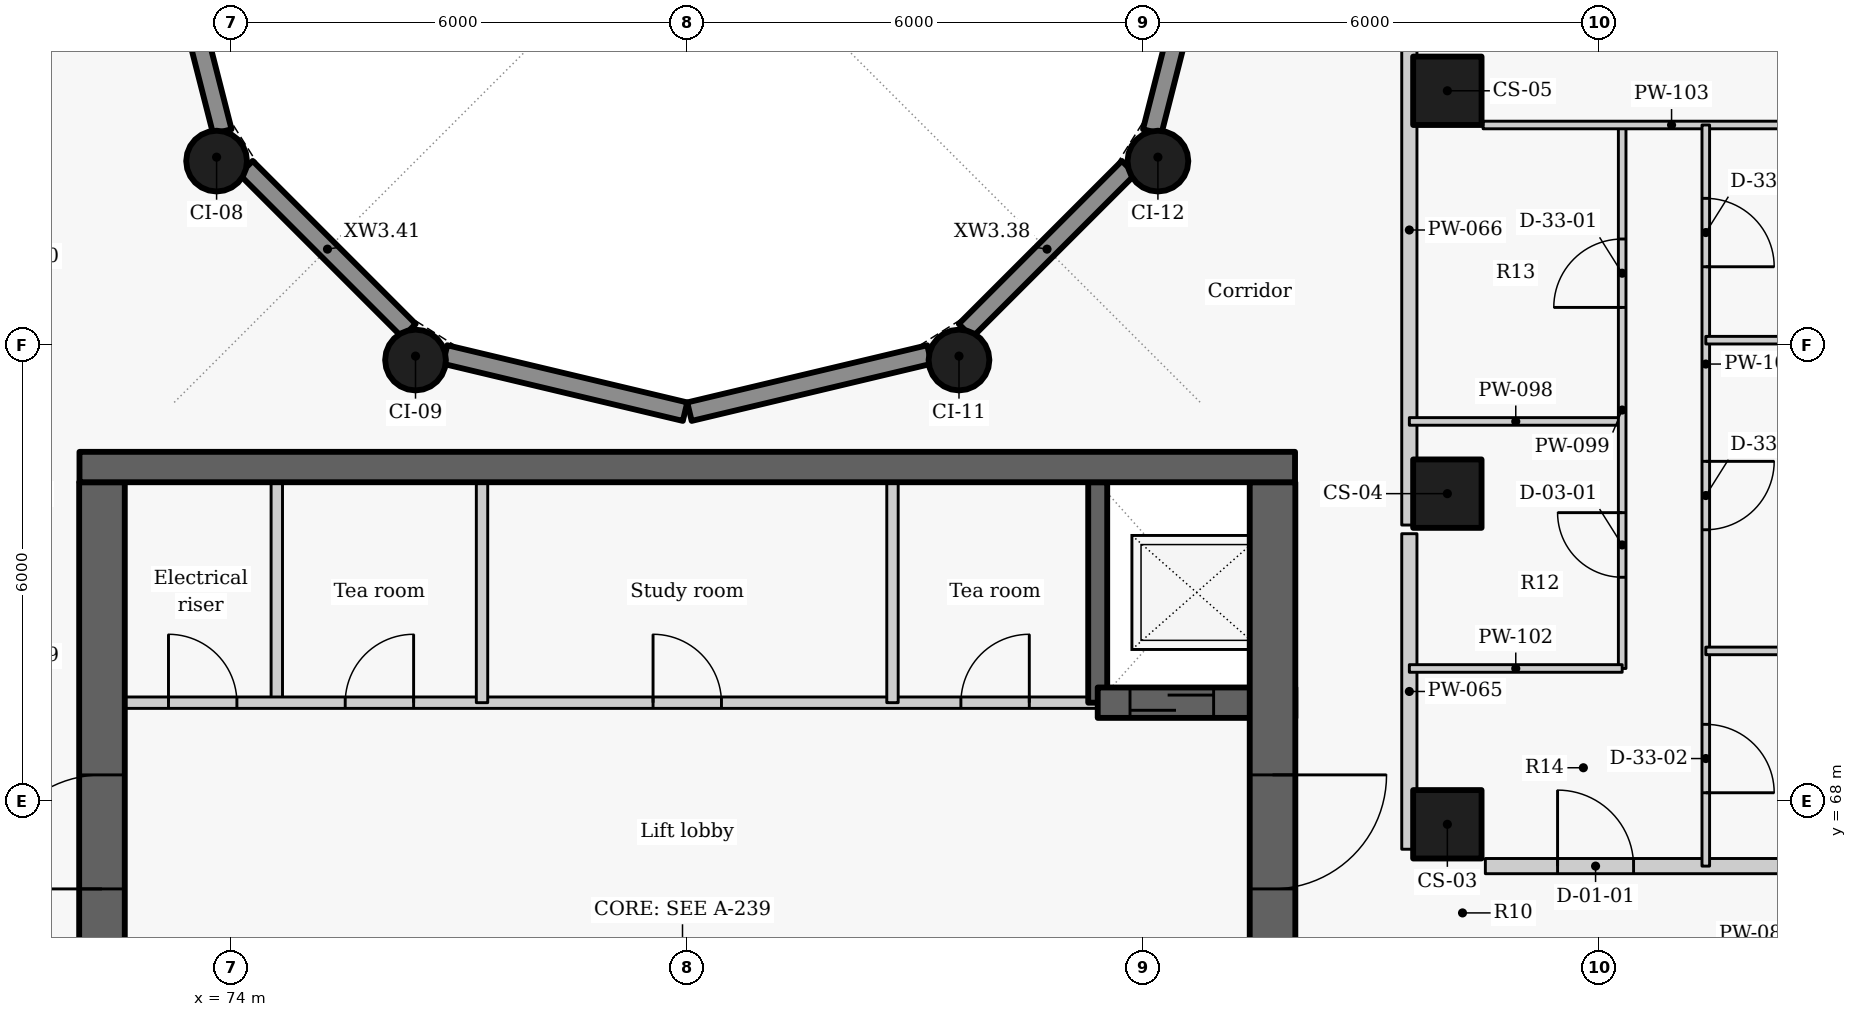
"""IFC4 building model, lengths in metres.
Left out: names, types, materials, properties, quantities, classifications, styles, units other than length and angle.
Written with IfcOpenShell. Run it as: python <this file> out.ifc"""

import sys

from ifc_helpers import new_model, si_unit, direction, frame, frame_2d, origin, origin_2d, place, context, subcontext, project, spatial, rectangle, circle, extrude, element, fill, save


model = new_model("IFC4")
c1 = context("Model", 3, precision=1e-05, world=origin(), true_north=direction((0.0, 1.0)))
c2 = subcontext(c1, "Body", "Model", "MODEL_VIEW")
j1 = project(units=[si_unit("LENGTHUNIT", "METRE"), si_unit("PLANEANGLEUNIT", "RADIAN")], contexts=[c1])
p1 = place(None, origin())
s1 = spatial("IfcSite", under=j1, at=p1, CompositionType="ELEMENT")
p2 = place(p1, origin())
s2 = spatial("IfcBuilding", under=s1, at=p2, CompositionType="ELEMENT")
p3 = place(p2, frame((0.0, 0.0, 226.2)))
s3 = spatial("IfcBuildingStorey", under=s2, at=p3, CompositionType="ELEMENT", Elevation=226.2)
for number, where, z_axis, x_axis in (
    (1, (90.0, 67.7, 0.0), (0.0, 0.0, 1.0), (0.0, 1.0, 0.0)),
    (2, (90.0, 72.05, 0.0), (0.0, 0.0, 1.0), (0.0, 1.0, 0.0)),
    (3, (90.0, 77.35, 0.0), (0.0, 0.0, 1.0), (0.0, 1.0, 0.0)),
):
    element("IfcColumn", number, at=place(p3, frame(where, z_axis=z_axis, x_axis=x_axis)), inside=s3, PredefinedType="COLUMN", context=c2, shape_type="SweptSolid", body=[
        extrude(rectangle(XDim=0.9, YDim=0.9, at=origin_2d()), origin(), (0.0, 0.0, 1.0), 3.3),
    ])
for number, where, z_axis, x_axis in (
    (4, (73.808, 76.425, 0.0), (0.0, 0.0, 1.0), (0.5, -0.866, 0.0)),
    (5, (76.425, 73.808, 0.0), (0.0, 0.0, 1.0), (0.866, -0.5, 0.0)),
    (6, (83.575, 73.808, 0.0), (0.0, 0.0, 1.0), (0.866, 0.5, 0.0)),
    (7, (86.192, 76.425, 0.0), (0.0, 0.0, 1.0), (0.5, 0.866, 0.0)),
):
    element("IfcColumn", number, at=place(p3, frame(where, z_axis=z_axis, x_axis=x_axis)), inside=s3, PredefinedType="COLUMN", context=c2, shape_type="SweptSolid", body=[
        extrude(circle(Radius=0.4, at=origin_2d()), origin(), (0.0, 0.0, 1.0), 3.3),
    ])
p4 = place(p3, frame((86.86, 79.73, 0.0), z_axis=(0.0, 0.0, 1.0), x_axis=(-0.247055971283, -0.969001211069, 0.0)))
e8 = element("IfcWall", 8, at=p4, inside=s3, PredefinedType="SOLIDWALL", context=c2, shape_type="SweptSolid", body=[
    extrude(rectangle(XDim=3.01, YDim=0.25, at=frame_2d((1.505, 0.0))), origin(), (0.0, 0.0, 1.0), 2.425),
])
p5 = place(p3, frame((85.806, 76.339, 0.0), z_axis=(0.0, 0.0, 1.0), x_axis=(-0.707106781187, -0.707106781187, 0.0)))
e9 = element("IfcWall", 9, at=p5, inside=s3, PredefinedType="SOLIDWALL", context=c2, shape_type="SweptSolid", body=[
    extrude(rectangle(XDim=3.033, YDim=0.25, at=frame_2d((1.517, 0.0))), origin(), (0.0, 0.0, 1.0), 2.425),
])
for number, where, z_axis, x_axis in (
    (10, (83.186, 73.881, 0.0), (0.0, 0.0, 1.0), (-0.973, -0.232, 0.0)),
    (11, (79.971, 73.128, 0.0), (0.0, 0.0, 1.0), (-0.973, 0.232, 0.0)),
):
    element("IfcWall", number, at=place(p3, frame(where, z_axis=z_axis, x_axis=x_axis)), inside=s3, PredefinedType="SOLIDWALL", context=c2, shape_type="SweptSolid", body=[
        extrude(rectangle(XDim=3.246, YDim=0.25, at=frame_2d((1.623, 0.0))), origin(), (0.0, 0.0, 1.0), 2.425),
    ])
p6 = place(p3, frame((76.339, 74.194, 0.0), z_axis=(0.0, 0.0, 1.0), x_axis=(-0.707106781187, 0.707106781187, 0.0)))
e12 = element("IfcWall", 12, at=p6, inside=s3, PredefinedType="SOLIDWALL", context=c2, shape_type="SweptSolid", body=[
    extrude(rectangle(XDim=3.033, YDim=0.25, at=frame_2d((1.517, 0.0))), origin(), (0.0, 0.0, 1.0), 2.425),
])
p7 = place(p3, frame((73.883, 76.813, 0.0), z_axis=(0.0, 0.0, 1.0), x_axis=(-0.247055971283, 0.969001211069, 0.0)))
e13 = element("IfcWall", 13, at=p7, inside=s3, PredefinedType="SOLIDWALL", context=c2, shape_type="SweptSolid", body=[
    extrude(rectangle(XDim=3.01, YDim=0.25, at=frame_2d((1.505, 0.0))), origin(), (0.0, 0.0, 1.0), 2.425),
])
p8 = place(p3, frame((74.6, 69.3, 0.0), z_axis=(0.0, 0.0, 1.0), x_axis=(0.0, 1.0, 0.0)))
e14 = element("IfcWall", 14, at=p8, inside=s3, PredefinedType="PARTITIONING", context=c2, shape_type="SweptSolid", body=[
    extrude(rectangle(XDim=2.9, YDim=0.15, at=frame_2d((1.45, 0.0))), origin(), (0.0, 0.0, 1.0), 3.025),
])
p9 = place(p3, frame((72.0, 69.3, 0.0), z_axis=(0.0, 0.0, 1.0), x_axis=(1.0, 0.0, 0.0)))
e15 = element("IfcWall", 15, at=p9, inside=s3, PredefinedType="PARTITIONING", context=c2, shape_type="SweptSolid", body=[
    extrude(rectangle(XDim=13.4, YDim=0.15, at=frame_2d((6.7, 0.0))), origin(), (0.0, 0.0, 1.0), 3.025),
])
p10 = place(p9, frame((1.175, 0.0, 0.0)))
e16 = element("IfcOpeningElement", 16, at=p10, cuts=e15, PredefinedType="OPENING", context=c2, shape_type="SweptSolid", body=[
    extrude(rectangle(XDim=0.9, YDim=2.1, at=frame_2d((0.45, 1.05))), frame((0.0, 0.085, 0.0), z_axis=(0.0, -1.0, 0.0), x_axis=(1.0, 0.0, 0.0)), (0.0, 0.0, 1.0), 0.17),
])
p11 = place(p9, frame((3.5, 0.0, 0.0)))
e17 = element("IfcOpeningElement", 17, at=p11, cuts=e15, PredefinedType="OPENING", context=c2, shape_type="SweptSolid", body=[
    extrude(rectangle(XDim=0.9, YDim=2.1, at=frame_2d((0.45, 1.05))), frame((0.0, 0.085, 0.0), z_axis=(0.0, -1.0, 0.0), x_axis=(1.0, 0.0, 0.0)), (0.0, 0.0, 1.0), 0.17),
])
p12 = place(p9, frame((7.55, 0.0, 0.0)))
e18 = element("IfcOpeningElement", 18, at=p12, cuts=e15, PredefinedType="OPENING", context=c2, shape_type="SweptSolid", body=[
    extrude(rectangle(XDim=0.9, YDim=2.1, at=frame_2d((0.45, 1.05))), frame((0.0, 0.085, 0.0), z_axis=(0.0, -1.0, 0.0), x_axis=(1.0, 0.0, 0.0)), (0.0, 0.0, 1.0), 0.17),
])
p13 = place(p9, frame((11.6, 0.0, 0.0)))
e19 = element("IfcOpeningElement", 19, at=p13, cuts=e15, PredefinedType="OPENING", context=c2, shape_type="SweptSolid", body=[
    extrude(rectangle(XDim=0.9, YDim=2.1, at=frame_2d((0.45, 1.05))), frame((0.0, 0.085, 0.0), z_axis=(0.0, -1.0, 0.0), x_axis=(1.0, 0.0, 0.0)), (0.0, 0.0, 1.0), 0.17),
])
p14 = place(p3, frame((72.3, 63.1, -0.41), z_axis=(0.0, 0.0, 1.0), x_axis=(0.0, 1.0, 0.0)))
e20 = element("IfcWall", 20, at=p14, inside=s3, PredefinedType="SHEAR", context=c2, shape_type="SweptSolid", body=[
    extrude(rectangle(XDim=9.1, YDim=0.6, at=frame_2d((4.55, 0.0))), origin(), (0.0, 0.0, 1.0), 3.435),
])
p15 = place(p14, frame((3.75, 0.0, 0.41)))
e21 = element("IfcOpeningElement", 21, at=p15, cuts=e20, PredefinedType="OPENING", context=c2, shape_type="SweptSolid", body=[
    extrude(rectangle(XDim=1.5, YDim=2.1, at=frame_2d((0.75, 1.05))), frame((0.0, 0.31, 0.0), z_axis=(0.0, -1.0, 0.0), x_axis=(1.0, 0.0, 0.0)), (0.0, 0.0, 1.0), 0.62),
])
p16 = place(p3, frame((85.4, 69.3, -0.41), z_axis=(0.0, 0.0, 1.0), x_axis=(0.0, 1.0, 0.0)))
e22 = element("IfcWall", 22, at=p16, inside=s3, PredefinedType="SHEAR", context=c2, shape_type="SweptSolid", body=[
    extrude(rectangle(XDim=2.9, YDim=0.25, at=frame_2d((1.45, 0.0))), origin(), (0.0, 0.0, 1.0), 3.435),
])
p17 = place(p3, frame((85.4, 69.3, -0.41), z_axis=(0.0, 0.0, 1.0), x_axis=(1.0, 0.0, 0.0)))
e23 = element("IfcWall", 23, at=p17, inside=s3, PredefinedType="SHEAR", context=c2, shape_type="SweptSolid", body=[
    extrude(rectangle(XDim=2.6, YDim=0.4, at=frame_2d((1.3, 0.0))), origin(), (0.0, 0.0, 1.0), 3.435),
])
p18 = place(p17, frame((0.425, 0.0, 0.41)))
e24 = element("IfcOpeningElement", 24, at=p18, cuts=e23, PredefinedType="OPENING", context=c2, shape_type="SweptSolid", body=[
    extrude(rectangle(XDim=1.1, YDim=2.1, at=frame_2d((0.55, 1.05))), frame((0.0, 0.21, 0.0), z_axis=(0.0, -1.0, 0.0), x_axis=(1.0, 0.0, 0.0)), (0.0, 0.0, 1.0), 0.42),
])
p19 = place(p3, frame((87.7, 72.2, -0.41), z_axis=(0.0, 0.0, 1.0), x_axis=(0.0, -1.0, 0.0)))
e25 = element("IfcWall", 25, at=p19, inside=s3, PredefinedType="SHEAR", context=c2, shape_type="SweptSolid", body=[
    extrude(rectangle(XDim=14.25, YDim=0.6, at=frame_2d((7.125, 0.0))), origin(), (0.0, 0.0, 1.0), 3.435),
])
p20 = place(p19, frame((3.85, 0.0, 0.41)))
e26 = element("IfcOpeningElement", 26, at=p20, cuts=e25, PredefinedType="OPENING", context=c2, shape_type="SweptSolid", body=[
    extrude(rectangle(XDim=1.5, YDim=2.1, at=frame_2d((0.75, 1.05))), frame((0.0, 0.31, 0.0), z_axis=(0.0, -1.0, 0.0), x_axis=(1.0, 0.0, 0.0)), (0.0, 0.0, 1.0), 0.62),
])
p21 = place(p19, frame((11.125, 0.0, 0.41)))
e27 = element("IfcOpeningElement", 27, at=p21, cuts=e25, PredefinedType="OPENING", context=c2, shape_type="SweptSolid", body=[
    extrude(rectangle(XDim=1.1, YDim=2.1, at=frame_2d((0.55, 1.05))), frame((0.0, 0.31, 0.0), z_axis=(0.0, -1.0, 0.0), x_axis=(1.0, 0.0, 0.0)), (0.0, 0.0, 1.0), 0.62),
])
for number, where, z_axis, x_axis in (
    (28, (77.3, 69.3, 0.0), (0.0, 0.0, 1.0), (0.0, 1.0, 0.0)),
    (29, (82.7, 69.3, 0.0), (0.0, 0.0, 1.0), (0.0, 1.0, 0.0)),
):
    element("IfcWall", number, at=place(p3, frame(where, z_axis=z_axis, x_axis=x_axis)), inside=s3, PredefinedType="PARTITIONING", context=c2, shape_type="SweptSolid", body=[
        extrude(rectangle(XDim=2.9, YDim=0.15, at=frame_2d((1.45, 0.0))), origin(), (0.0, 0.0, 1.0), 3.025),
    ])
p22 = place(p3, frame((89.5, 67.372, 0.0), z_axis=(0.0, 0.0, 1.0), x_axis=(0.0, 1.0, 0.0)))
e30 = element("IfcWall", 30, at=p22, inside=s3, PredefinedType="PARTITIONING", context=c2, shape_type="SweptSolid", body=[
    extrude(rectangle(XDim=4.151, YDim=0.2, at=frame_2d((2.075, 0.0))), origin(), (0.0, 0.0, 1.0), 3.025),
])
p23 = place(p3, frame((89.5, 87.423, 0.0), z_axis=(0.0, 0.0, 1.0), x_axis=(0.0, -1.0, 0.0)))
e31 = element("IfcWall", 31, at=p23, inside=s3, PredefinedType="PARTITIONING", context=c2, shape_type="SweptSolid", body=[
    extrude(rectangle(XDim=15.786, YDim=0.2, at=frame_2d((7.893, 0.0))), origin(), (0.0, 0.0, 1.0), 3.025),
])
p24 = place(p23, frame((6.923, 0.0, 0.0)))
e32 = element("IfcOpeningElement", 32, at=p24, cuts=e31, PredefinedType="OPENING", context=c2, shape_type="SweptSolid", body=[
    extrude(rectangle(XDim=1.0, YDim=2.1, at=frame_2d((0.5, 1.05))), frame((0.0, 0.11, 0.0), z_axis=(0.0, -1.0, 0.0), x_axis=(1.0, 0.0, 0.0)), (0.0, 0.0, 1.0), 0.22),
])
p25 = place(p23, frame((3.023, 0.0, 0.0)))
e33 = element("IfcOpeningElement", 33, at=p25, cuts=e31, PredefinedType="OPENING", context=c2, shape_type="SweptSolid", body=[
    extrude(rectangle(XDim=1.0, YDim=2.1, at=frame_2d((0.5, 1.05))), frame((0.0, 0.11, 0.0), z_axis=(0.0, -1.0, 0.0), x_axis=(1.0, 0.0, 0.0)), (0.0, 0.0, 1.0), 0.22),
])
p26 = place(p3, frame((90.5, 67.15, 0.0), z_axis=(0.0, 0.0, 1.0), x_axis=(1.0, 0.0, 0.0)))
e34 = element("IfcWall", 34, at=p26, inside=s3, PredefinedType="PARTITIONING", context=c2, shape_type="SweptSolid", body=[
    extrude(rectangle(XDim=7.889, YDim=0.2, at=frame_2d((3.944, 0.0))), origin(), (0.0, 0.0, 1.0), 2.405),
])
p27 = place(p26, frame((0.95, 0.0, 0.0)))
e35 = element("IfcOpeningElement", 35, at=p27, cuts=e34, PredefinedType="OPENING", context=c2, shape_type="SweptSolid", body=[
    extrude(rectangle(XDim=1.0, YDim=2.1, at=frame_2d((0.5, 1.05))), frame((0.0, 0.11, 0.0), z_axis=(0.0, -1.0, 0.0), x_axis=(1.0, 0.0, 0.0)), (0.0, 0.0, 1.0), 0.22),
])
p28 = place(p3, frame((89.5, 73.0, 0.0), z_axis=(0.0, 0.0, 1.0), x_axis=(1.0, 0.0, 0.0)))
e36 = element("IfcWall", 36, at=p28, inside=s3, PredefinedType="PARTITIONING", context=c2, shape_type="SweptSolid", body=[
    extrude(rectangle(XDim=2.8, YDim=0.1, at=frame_2d((1.4, 0.0))), origin(), (0.0, 0.0, 1.0), 2.505),
])
p29 = place(p3, frame((92.3, 69.75, 0.0), z_axis=(0.0, 0.0, 1.0), x_axis=(0.0, 1.0, 0.0)))
e37 = element("IfcWall", 37, at=p29, inside=s3, PredefinedType="PARTITIONING", context=c2, shape_type="SweptSolid", body=[
    extrude(rectangle(XDim=7.15, YDim=0.1, at=frame_2d((3.575, 0.0))), origin(), (0.0, 0.0, 1.0), 3.025),
])
p30 = place(p29, frame((1.2, 0.0, 0.0)))
e38 = element("IfcOpeningElement", 38, at=p30, cuts=e37, PredefinedType="OPENING", context=c2, shape_type="SweptSolid", body=[
    extrude(rectangle(XDim=0.85, YDim=2.1, at=frame_2d((0.425, 1.05))), frame((0.0, 0.06, 0.0), z_axis=(0.0, -1.0, 0.0), x_axis=(1.0, 0.0, 0.0)), (0.0, 0.0, 1.0), 0.12),
])
p31 = place(p29, frame((4.75, 0.0, 0.0)))
e39 = element("IfcOpeningElement", 39, at=p31, cuts=e37, PredefinedType="OPENING", context=c2, shape_type="SweptSolid", body=[
    extrude(rectangle(XDim=0.9, YDim=2.1, at=frame_2d((0.45, 1.05))), frame((0.0, 0.06, 0.0), z_axis=(0.0, -1.0, 0.0), x_axis=(1.0, 0.0, 0.0)), (0.0, 0.0, 1.0), 0.12),
])
p32 = place(p3, frame((89.5, 69.75, 0.0), z_axis=(0.0, 0.0, 1.0), x_axis=(1.0, 0.0, 0.0)))
e40 = element("IfcWall", 40, at=p32, inside=s3, PredefinedType="PARTITIONING", context=c2, shape_type="SweptSolid", body=[
    extrude(rectangle(XDim=2.8, YDim=0.1, at=frame_2d((1.4, 0.0))), origin(), (0.0, 0.0, 1.0), 2.505),
])
p33 = place(p3, frame((90.47, 76.9, 0.0), z_axis=(0.0, 0.0, 1.0), x_axis=(1.0, 0.0, 0.0)))
e41 = element("IfcWall", 41, at=p33, inside=s3, PredefinedType="PARTITIONING", context=c2, shape_type="SweptSolid", body=[
    extrude(rectangle(XDim=4.959, YDim=0.1, at=frame_2d((2.48, 0.0))), origin(), (0.0, 0.0, 1.0), 3.025),
])
p34 = place(p3, frame((93.4, 76.9, 0.0), z_axis=(0.0, 0.0, 1.0), x_axis=(0.0, -1.0, 0.0)))
e42 = element("IfcWall", 42, at=p34, inside=s3, PredefinedType="PARTITIONING", context=c2, shape_type="SweptSolid", body=[
    extrude(rectangle(XDim=9.75, YDim=0.1, at=frame_2d((4.875, 0.0))), origin(), (0.0, 0.0, 1.0), 3.025),
])
p35 = place(p34, frame((7.885, 0.0, 0.0)))
e43 = element("IfcOpeningElement", 43, at=p35, cuts=e42, PredefinedType="OPENING", context=c2, shape_type="SweptSolid", body=[
    extrude(rectangle(XDim=0.9, YDim=2.1, at=frame_2d((0.45, 1.05))), frame((0.0, 0.06, 0.0), z_axis=(0.0, -1.0, 0.0), x_axis=(1.0, 0.0, 0.0)), (0.0, 0.0, 1.0), 0.12),
])
p36 = place(p34, frame((4.425, 0.0, 0.0)))
e44 = element("IfcOpeningElement", 44, at=p36, cuts=e42, PredefinedType="OPENING", context=c2, shape_type="SweptSolid", body=[
    extrude(rectangle(XDim=0.9, YDim=2.1, at=frame_2d((0.45, 1.05))), frame((0.0, 0.06, 0.0), z_axis=(0.0, -1.0, 0.0), x_axis=(1.0, 0.0, 0.0)), (0.0, 0.0, 1.0), 0.12),
])
p37 = place(p34, frame((0.965, 0.0, 0.0)))
e45 = element("IfcOpeningElement", 45, at=p37, cuts=e42, PredefinedType="OPENING", context=c2, shape_type="SweptSolid", body=[
    extrude(rectangle(XDim=0.9, YDim=2.1, at=frame_2d((0.45, 1.05))), frame((0.0, 0.06, 0.0), z_axis=(0.0, -1.0, 0.0), x_axis=(1.0, 0.0, 0.0)), (0.0, 0.0, 1.0), 0.12),
])
p38 = place(p3, frame((93.4, 69.981, 0.0), z_axis=(0.0, 0.0, 1.0), x_axis=(1.0, 0.0, 0.0)))
e46 = element("IfcWall", 46, at=p38, inside=s3, PredefinedType="PARTITIONING", context=c2, shape_type="SweptSolid", body=[
    extrude(rectangle(XDim=6.623, YDim=0.1, at=frame_2d((3.312, 0.0))), origin(), (0.0, 0.0, 1.0), 2.405),
])
p39 = place(p3, frame((93.4, 74.069, 0.0), z_axis=(0.0, 0.0, 1.0), x_axis=(1.0, 0.0, 0.0)))
e47 = element("IfcWall", 47, at=p39, inside=s3, PredefinedType="PARTITIONING", context=c2, shape_type="SweptSolid", body=[
    extrude(rectangle(XDim=8.984, YDim=0.1, at=frame_2d((4.492, 0.0))), origin(), (0.0, 0.0, 1.0), 2.405),
])
p40 = place(p3, frame((72.004, 72.4, -0.41), z_axis=(0.0, 0.0, 1.0), x_axis=(1.0, 0.0, 0.0)))
e48 = element("IfcWall", 48, at=p40, inside=s3, PredefinedType="SHEAR", context=c2, shape_type="SweptSolid", body=[
    extrude(rectangle(XDim=15.992, YDim=0.4, at=frame_2d((7.996, 0.0))), origin(), (0.0, 0.0, 1.0), 3.435),
])
p41 = place(p10, origin())
e49 = element("IfcDoor", 49, at=p41, inside=s3, OperationType="SINGLE_SWING_LEFT", PredefinedType="DOOR", context=c2, shape_type="SweptSolid", body=[
    extrude(rectangle(XDim=0.9, YDim=2.1, at=frame_2d((0.45, 1.05))), frame((0.0, 0.025, 0.0), z_axis=(0.0, -1.0, 0.0), x_axis=(1.0, 0.0, 0.0)), (0.0, 0.0, 1.0), 0.05),
])
fill(e16, e49)
p42 = place(p18, origin())
e50 = element("IfcDoor", 50, at=p42, inside=s3, OperationType="SLIDING_TO_LEFT", PredefinedType="DOOR", context=c2, shape_type="SweptSolid", body=[
    extrude(rectangle(XDim=1.1, YDim=2.1, at=frame_2d((0.55, 1.05))), frame((0.0, 0.025, 0.0), z_axis=(0.0, -1.0, 0.0), x_axis=(1.0, 0.0, 0.0)), (0.0, 0.0, 1.0), 0.05),
])
fill(e24, e50)
p43 = place(p11, origin())
e51 = element("IfcDoor", 51, at=p43, inside=s3, OperationType="SINGLE_SWING_RIGHT", PredefinedType="DOOR", context=c2, shape_type="SweptSolid", body=[
    extrude(rectangle(XDim=0.9, YDim=2.1, at=frame_2d((0.45, 1.05))), frame((0.0, 0.025, 0.0), z_axis=(0.0, -1.0, 0.0), x_axis=(1.0, 0.0, 0.0)), (0.0, 0.0, 1.0), 0.05),
])
fill(e17, e51)
p44 = place(p12, origin())
e52 = element("IfcDoor", 52, at=p44, inside=s3, OperationType="SINGLE_SWING_LEFT", PredefinedType="DOOR", context=c2, shape_type="SweptSolid", body=[
    extrude(rectangle(XDim=0.9, YDim=2.1, at=frame_2d((0.45, 1.05))), frame((0.0, 0.025, 0.0), z_axis=(0.0, -1.0, 0.0), x_axis=(1.0, 0.0, 0.0)), (0.0, 0.0, 1.0), 0.05),
])
fill(e18, e52)
p45 = place(p13, origin())
e53 = element("IfcDoor", 53, at=p45, inside=s3, OperationType="SINGLE_SWING_RIGHT", PredefinedType="DOOR", context=c2, shape_type="SweptSolid", body=[
    extrude(rectangle(XDim=0.9, YDim=2.1, at=frame_2d((0.45, 1.05))), frame((0.0, 0.025, 0.0), z_axis=(0.0, -1.0, 0.0), x_axis=(1.0, 0.0, 0.0)), (0.0, 0.0, 1.0), 0.05),
])
fill(e19, e53)
p46 = place(p27, origin())
e54 = element("IfcDoor", 54, at=p46, inside=s3, OperationType="SINGLE_SWING_LEFT", PredefinedType="DOOR", context=c2, shape_type="SweptSolid", body=[
    extrude(rectangle(XDim=1.0, YDim=2.1, at=frame_2d((0.5, 1.05))), frame((0.0, 0.025, 0.0), z_axis=(0.0, -1.0, 0.0), x_axis=(1.0, 0.0, 0.0)), (0.0, 0.0, 1.0), 0.05),
])
fill(e35, e54)
p47 = place(p30, origin())
e55 = element("IfcDoor", 55, at=p47, inside=s3, OperationType="SINGLE_SWING_RIGHT", PredefinedType="DOOR", context=c2, shape_type="SweptSolid", body=[
    extrude(rectangle(XDim=0.85, YDim=2.1, at=frame_2d((0.425, 1.05))), frame((0.0, 0.025, 0.0), z_axis=(0.0, -1.0, 0.0), x_axis=(1.0, 0.0, 0.0)), (0.0, 0.0, 1.0), 0.05),
])
fill(e38, e55)
p48 = place(p31, origin())
e56 = element("IfcDoor", 56, at=p48, inside=s3, OperationType="SINGLE_SWING_LEFT", PredefinedType="DOOR", context=c2, shape_type="SweptSolid", body=[
    extrude(rectangle(XDim=0.9, YDim=2.1, at=frame_2d((0.45, 1.05))), frame((0.0, 0.025, 0.0), z_axis=(0.0, -1.0, 0.0), x_axis=(1.0, 0.0, 0.0)), (0.0, 0.0, 1.0), 0.05),
])
fill(e39, e56)
p49 = place(p35, origin())
e57 = element("IfcDoor", 57, at=p49, inside=s3, OperationType="SINGLE_SWING_RIGHT", PredefinedType="DOOR", context=c2, shape_type="SweptSolid", body=[
    extrude(rectangle(XDim=0.9, YDim=2.1, at=frame_2d((0.45, 1.05))), frame((0.0, 0.025, 0.0), z_axis=(0.0, -1.0, 0.0), x_axis=(1.0, 0.0, 0.0)), (0.0, 0.0, 1.0), 0.05),
])
fill(e43, e57)
p50 = place(p36, origin())
e58 = element("IfcDoor", 58, at=p50, inside=s3, OperationType="SINGLE_SWING_LEFT", PredefinedType="DOOR", context=c2, shape_type="SweptSolid", body=[
    extrude(rectangle(XDim=0.9, YDim=2.1, at=frame_2d((0.45, 1.05))), frame((0.0, 0.025, 0.0), z_axis=(0.0, -1.0, 0.0), x_axis=(1.0, 0.0, 0.0)), (0.0, 0.0, 1.0), 0.05),
])
fill(e44, e58)
p51 = place(p37, origin())
e59 = element("IfcDoor", 59, at=p51, inside=s3, OperationType="SINGLE_SWING_RIGHT", PredefinedType="DOOR", context=c2, shape_type="SweptSolid", body=[
    extrude(rectangle(XDim=0.9, YDim=2.1, at=frame_2d((0.45, 1.05))), frame((0.0, 0.025, 0.0), z_axis=(0.0, -1.0, 0.0), x_axis=(1.0, 0.0, 0.0)), (0.0, 0.0, 1.0), 0.05),
])
fill(e45, e59)
p52 = place(p20, origin())
e60 = element("IfcDoor", 60, at=p52, inside=s3, OperationType="DOUBLE_DOOR_SINGLE_SWING", PredefinedType="DOOR", context=c2, shape_type="SweptSolid", body=[
    extrude(rectangle(XDim=1.5, YDim=2.1, at=frame_2d((0.75, 1.05))), frame((0.0, 0.025, 0.0), z_axis=(0.0, -1.0, 0.0), x_axis=(1.0, 0.0, 0.0)), (0.0, 0.0, 1.0), 0.05),
])
fill(e26, e60)
p53 = place(p15, origin())
e61 = element("IfcDoor", 61, at=p53, inside=s3, OperationType="DOUBLE_DOOR_SINGLE_SWING", PredefinedType="DOOR", context=c2, shape_type="SweptSolid", body=[
    extrude(rectangle(XDim=1.5, YDim=2.1, at=frame_2d((0.75, 1.05))), frame((0.0, 0.025, 0.0), z_axis=(0.0, -1.0, 0.0), x_axis=(1.0, 0.0, 0.0)), (0.0, 0.0, 1.0), 0.05),
])
fill(e21, e61)
save(model, sys.argv[1])
